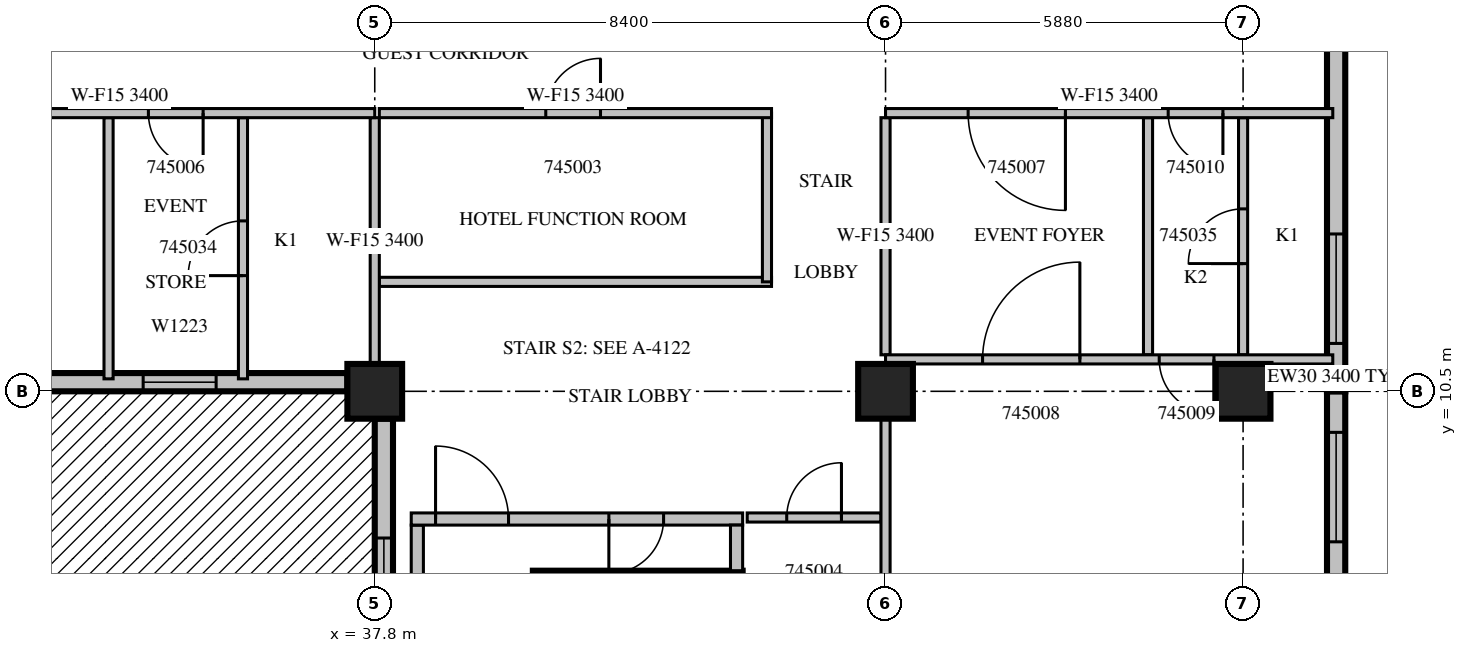
"""IFC4 building model, lengths in metres.
Left out: names, types, materials, properties, quantities, classifications, styles, units other than length and angle.
Written with IfcOpenShell. Run it as: python <this file> out.ifc"""

import sys

from ifc_helpers import new_model, si_unit, direction, frame, frame_2d, origin, origin_2d, place, context, subcontext, project, spatial, rectangle, extrude, source, transform, mapped, element, fill, save


model = new_model("IFC4")
c1 = context("Model", 3, precision=1e-05, world=origin(), true_north=direction((0.0, 1.0)))
c2 = subcontext(c1, "Body", "Model", "MODEL_VIEW")
j1 = project(units=[si_unit("LENGTHUNIT", "METRE"), si_unit("PLANEANGLEUNIT", "RADIAN")], contexts=[c1])
p1 = place(None, origin())
s1 = spatial("IfcSite", under=j1, at=p1, CompositionType="ELEMENT")
p2 = place(p1, origin())
s2 = spatial("IfcBuilding", under=s1, at=p2, CompositionType="ELEMENT")
p3 = place(p2, frame((0.0, 0.0, 204.4)))
s3 = spatial("IfcBuildingStorey", under=s2, at=p3, CompositionType="ELEMENT", Elevation=204.4)
m1 = source(origin(), c2, "Body", "SweptSolid", [
    extrude(rectangle(XDim=0.9, YDim=0.9, at=origin_2d()), origin(), (0.0, 0.0, 1.0), 3.8),
])
for number, where, z_axis, x_axis in (
    (1, (37.8, 10.5, 0.0), (0.0, 0.0, 1.0), (1.0, 0.0, 0.0)),
    (2, (46.2, 10.5, 0.0), (0.0, 0.0, 1.0), (1.0, 0.0, 0.0)),
    (3, (52.08, 10.5, 0.0), (0.0, 0.0, 1.0), (1.0, 0.0, 0.0)),
):
    element("IfcColumn", number, at=place(p3, frame(where, z_axis=z_axis, x_axis=x_axis)), inside=s3, PredefinedType="COLUMN", context=c2, shape_type="MappedRepresentation", body=[
        mapped(m1, transform((0.0, 0.0, 0.0), scale=1.0)),
    ])
m2 = source(origin(), c2, "Body", "SweptSolid", [
    extrude(rectangle(XDim=7.5, YDim=0.3, at=frame_2d((3.75, 0.0))), origin(), (0.0, 0.0, 1.0), 3.4),
])
p4 = place(p3, frame((29.85, 10.65, 0.0), z_axis=(0.0, 0.0, 1.0), x_axis=(1.0, 0.0, 0.0)))
e4 = element("IfcWall", 4, at=p4, inside=s3, PredefinedType="STANDARD", context=c2, shape_type="MappedRepresentation", body=[
    mapped(m2, transform((0.0, 0.0, 0.0), scale=1.0)),
])
m3 = source(origin(), c2, "Body", "SweptSolid", [
    extrude(rectangle(XDim=1.8, YDim=2.4, at=frame_2d((0.9, 1.2))), frame((0.0, 0.16, 0.0), z_axis=(0.0, -1.0, 0.0), x_axis=(1.0, 0.0, 0.0)), (0.0, 0.0, 1.0), 0.32),
])
p5 = place(p4, frame((0.75, 0.0, 0.0)))
e5 = element("IfcOpeningElement", 5, at=p5, cuts=e4, PredefinedType="OPENING", context=c2, shape_type="MappedRepresentation", body=[
    mapped(m3, transform((0.0, 0.0, 0.0), scale=1.0)),
])
m4 = source(origin(), c2, "Body", "SweptSolid", [
    extrude(rectangle(XDim=1.2, YDim=2.3, at=frame_2d((0.6, 1.15))), frame((0.0, 0.16, 0.0), z_axis=(0.0, -1.0, 0.0), x_axis=(1.0, 0.0, 0.0)), (0.0, 0.0, 1.0), 0.32),
])
p6 = place(p4, frame((4.141, 0.0, 0.6)))
e6 = element("IfcOpeningElement", 6, at=p6, cuts=e4, PredefinedType="OPENING", context=c2, shape_type="MappedRepresentation", body=[
    mapped(m4, transform((0.0, 0.0, 0.0), scale=1.0)),
])
m5 = source(origin(), c2, "Body", "SweptSolid", [
    extrude(rectangle(XDim=9.15, YDim=0.3, at=frame_2d((4.575, 0.0))), origin(), (0.0, 0.0, 1.0), 3.4),
])
p7 = place(p3, frame((37.95, 10.05, 0.0), z_axis=(0.0, 0.0, 1.0), x_axis=(0.0, -1.0, 0.0)))
e7 = element("IfcWall", 7, at=p7, inside=s3, PredefinedType="STANDARD", context=c2, shape_type="MappedRepresentation", body=[
    mapped(m5, transform((0.0, 0.0, 0.0), scale=1.0)),
])
m6 = source(origin(), c2, "Body", "SweptSolid", [
    extrude(rectangle(XDim=1.8, YDim=2.3, at=frame_2d((0.9, 1.15))), frame((0.0, 0.16, 0.0), z_axis=(0.0, -1.0, 0.0), x_axis=(1.0, 0.0, 0.0)), (0.0, 0.0, 1.0), 0.32),
])
p8 = place(p7, frame((1.962, 0.0, 0.6)))
e8 = element("IfcOpeningElement", 8, at=p8, cuts=e7, PredefinedType="OPENING", context=c2, shape_type="MappedRepresentation", body=[
    mapped(m6, transform((0.0, 0.0, 0.0), scale=1.0)),
])
m7 = source(origin(), c2, "Body", "SweptSolid", [
    extrude(rectangle(XDim=3.0, YDim=2.3, at=frame_2d((1.5, 1.15))), frame((0.0, 0.16, 0.0), z_axis=(0.0, -1.0, 0.0), x_axis=(1.0, 0.0, 0.0)), (0.0, 0.0, 1.0), 0.32),
])
p9 = place(p7, frame((5.925, 0.0, 0.6)))
e9 = element("IfcOpeningElement", 9, at=p9, cuts=e7, PredefinedType="OPENING", context=c2, shape_type="MappedRepresentation", body=[
    mapped(m7, transform((0.0, 0.0, 0.0), scale=1.0)),
])
m8 = source(origin(), c2, "Body", "SweptSolid", [
    extrude(rectangle(XDim=6.3, YDim=0.3, at=frame_2d((3.15, 0.0))), origin(), (0.0, 0.0, 1.0), 3.4),
])
p10 = place(p3, frame((53.61, 4.2, 0.0), z_axis=(0.0, 0.0, 1.0), x_axis=(0.0, 1.0, 0.0)))
e10 = element("IfcWall", 10, at=p10, inside=s3, PredefinedType="STANDARD", context=c2, shape_type="MappedRepresentation", body=[
    mapped(m8, transform((0.0, 0.0, 0.0), scale=1.0)),
])
p11 = place(p10, frame((0.675, 0.0, 0.0)))
e11 = element("IfcOpeningElement", 11, at=p11, cuts=e10, PredefinedType="OPENING", context=c2, shape_type="MappedRepresentation", body=[
    mapped(m3, transform((0.0, 0.0, 0.0), scale=1.0)),
])
p12 = place(p10, frame((3.825, 0.0, 0.0)))
e12 = element("IfcOpeningElement", 12, at=p12, cuts=e10, PredefinedType="OPENING", context=c2, shape_type="MappedRepresentation", body=[
    mapped(m3, transform((0.0, 0.0, 0.0), scale=1.0)),
])
m9 = source(origin(), c2, "Body", "SweptSolid", [
    extrude(rectangle(XDim=6.75, YDim=0.3, at=frame_2d((3.375, 0.0))), origin(), (0.0, 0.0, 1.0), 3.4),
])
p13 = place(p3, frame((53.61, 10.5, 0.0), z_axis=(0.0, 0.0, 1.0), x_axis=(0.0, 1.0, 0.0)))
e13 = element("IfcWall", 13, at=p13, inside=s3, PredefinedType="STANDARD", context=c2, shape_type="MappedRepresentation", body=[
    mapped(m9, transform((0.0, 0.0, 0.0), scale=1.0)),
])
p14 = place(p13, frame((0.787, 0.0, 0.0)))
e14 = element("IfcOpeningElement", 14, at=p14, cuts=e13, PredefinedType="OPENING", context=c2, shape_type="MappedRepresentation", body=[
    mapped(m3, transform((0.0, 0.0, 0.0), scale=1.0)),
])
m10 = source(origin(), c2, "Body", "SweptSolid", [
    extrude(rectangle(XDim=3.45, YDim=0.25, at=frame_2d((1.725, 0.0))), origin(), (0.0, 0.0, 1.0), 3.4),
])
p15 = place(p3, frame((40.4, 7.425, 0.0), z_axis=(0.0, 0.0, 1.0), x_axis=(1.0, 0.0, 0.0)))
e15 = element("IfcWall", 15, at=p15, inside=s3, PredefinedType="SOLIDWALL", context=c2, shape_type="MappedRepresentation", body=[
    mapped(m10, transform((0.0, 0.0, 0.0), scale=1.0)),
])
m11 = source(origin(), c2, "Body", "SweptSolid", [
    extrude(rectangle(XDim=8.0, YDim=0.2, at=frame_2d((4.0, 0.0))), origin(), (0.0, 0.0, 1.0), 3.4),
])
p16 = place(p3, frame((38.5, 0.3, 0.0), z_axis=(0.0, 0.0, 1.0), x_axis=(0.0, 1.0, 0.0)))
e16 = element("IfcWall", 16, at=p16, inside=s3, PredefinedType="PARTITIONING", context=c2, shape_type="MappedRepresentation", body=[
    mapped(m11, transform((0.0, 0.0, 0.0), scale=1.0)),
])
m12 = source(origin(), c2, "Body", "SweptSolid", [
    extrude(rectangle(XDim=5.45, YDim=0.2, at=frame_2d((2.725, 0.0))), origin(), (0.0, 0.0, 1.0), 3.4),
])
p17 = place(p3, frame((38.4, 8.4, 0.0), z_axis=(0.0, 0.0, 1.0), x_axis=(1.0, 0.0, 0.0)))
e17 = element("IfcWall", 17, at=p17, inside=s3, PredefinedType="PARTITIONING", context=c2, shape_type="MappedRepresentation", body=[
    mapped(m12, transform((0.0, 0.0, 0.0), scale=1.0)),
])
m13 = source(origin(), c2, "Body", "SweptSolid", [
    extrude(rectangle(XDim=1.2, YDim=2.1, at=frame_2d((0.6, 1.05))), frame((0.0, 0.11, 0.0), z_axis=(0.0, -1.0, 0.0), x_axis=(1.0, 0.0, 0.0)), (0.0, 0.0, 1.0), 0.22),
])
p18 = place(p17, frame((0.4, 0.0, 0.0)))
e18 = element("IfcOpeningElement", 18, at=p18, cuts=e17, PredefinedType="OPENING", context=c2, shape_type="MappedRepresentation", body=[
    mapped(m13, transform((0.0, 0.0, 0.0), scale=1.0)),
])
m14 = source(origin(), c2, "Body", "SweptSolid", [
    extrude(rectangle(XDim=0.9, YDim=2.1, at=frame_2d((0.45, 1.05))), frame((0.0, 0.11, 0.0), z_axis=(0.0, -1.0, 0.0), x_axis=(1.0, 0.0, 0.0)), (0.0, 0.0, 1.0), 0.22),
])
p19 = place(p17, frame((3.25, 0.0, 0.0)))
e19 = element("IfcOpeningElement", 19, at=p19, cuts=e17, PredefinedType="OPENING", context=c2, shape_type="MappedRepresentation", body=[
    mapped(m14, transform((0.0, 0.0, 0.0), scale=1.0)),
])
m15 = source(origin(), c2, "Body", "SweptSolid", [
    extrude(rectangle(XDim=0.75, YDim=0.2, at=frame_2d((0.375, 0.0))), origin(), (0.0, 0.0, 1.0), 3.4),
])
p20 = place(p3, frame((43.75, 7.55, 0.0), z_axis=(0.0, 0.0, 1.0), x_axis=(0.0, 1.0, 0.0)))
e20 = element("IfcWall", 20, at=p20, inside=s3, PredefinedType="PARTITIONING", context=c2, shape_type="MappedRepresentation", body=[
    mapped(m15, transform((0.0, 0.0, 0.0), scale=1.0)),
])
m16 = source(origin(), c2, "Body", "SweptSolid", [
    extrude(rectangle(XDim=6.45, YDim=0.15, at=frame_2d((3.225, 0.0))), origin(), (0.0, 0.0, 1.0), 3.4),
])
p21 = place(p3, frame((37.875, 12.3, 0.0), z_axis=(0.0, 0.0, 1.0), x_axis=(1.0, 0.0, 0.0)))
e21 = element("IfcWall", 21, at=p21, inside=s3, PredefinedType="PARTITIONING", context=c2, shape_type="MappedRepresentation", body=[
    mapped(m16, transform((0.0, 0.0, 0.0), scale=1.0)),
])
m17 = source(origin(), c2, "Body", "SweptSolid", [
    extrude(rectangle(XDim=2.775, YDim=0.15, at=frame_2d((1.387, 0.0))), origin(), (0.0, 0.0, 1.0), 3.4),
])
p22 = place(p3, frame((44.25, 12.3, 0.0), z_axis=(0.0, 0.0, 1.0), x_axis=(0.0, 1.0, 0.0)))
e22 = element("IfcWall", 22, at=p22, inside=s3, PredefinedType="PARTITIONING", context=c2, shape_type="MappedRepresentation", body=[
    mapped(m17, transform((0.0, 0.0, 0.0), scale=1.0)),
])
p23 = place(p3, frame((44.325, 15.075, 0.0), z_axis=(0.0, 0.0, 1.0), x_axis=(-1.0, 0.0, 0.0)))
e23 = element("IfcWall", 23, at=p23, inside=s3, PredefinedType="PARTITIONING", context=c2, shape_type="MappedRepresentation", body=[
    mapped(m16, transform((0.0, 0.0, 0.0), scale=1.0)),
])
m18 = source(origin(), c2, "Body", "SweptSolid", [
    extrude(rectangle(XDim=0.9, YDim=2.1, at=frame_2d((0.45, 1.05))), frame((0.0, 0.085, 0.0), z_axis=(0.0, -1.0, 0.0), x_axis=(1.0, 0.0, 0.0)), (0.0, 0.0, 1.0), 0.17),
])
p24 = place(p23, frame((2.812, 0.0, 0.0)))
e24 = element("IfcOpeningElement", 24, at=p24, cuts=e23, PredefinedType="OPENING", context=c2, shape_type="MappedRepresentation", body=[
    mapped(m18, transform((0.0, 0.0, 0.0), scale=1.0)),
])
m19 = source(origin(), c2, "Body", "SweptSolid", [
    extrude(rectangle(XDim=2.2, YDim=0.15, at=frame_2d((1.1, 0.0))), origin(), (0.0, 0.0, 1.0), 3.4),
])
p25 = place(p3, frame((46.125, 8.425, 0.0), z_axis=(0.0, 0.0, 1.0), x_axis=(-1.0, 0.0, 0.0)))
e25 = element("IfcWall", 25, at=p25, inside=s3, PredefinedType="PARTITIONING", context=c2, shape_type="MappedRepresentation", body=[
    mapped(m19, transform((0.0, 0.0, 0.0), scale=1.0)),
])
p26 = place(p25, frame((0.65, 0.0, 0.0)))
e26 = element("IfcOpeningElement", 26, at=p26, cuts=e25, PredefinedType="OPENING", context=c2, shape_type="MappedRepresentation", body=[
    mapped(m18, transform((0.0, 0.0, 0.0), scale=1.0)),
])
m20 = source(origin(), c2, "Body", "SweptSolid", [
    extrude(rectangle(XDim=4.295, YDim=0.15, at=frame_2d((2.147, 0.0))), origin(), (0.0, 0.0, 1.0), 3.4),
])
p27 = place(p3, frame((33.422, 10.705, 0.0), z_axis=(0.0, 0.0, 1.0), x_axis=(0.0, 1.0, 0.0)))
e27 = element("IfcWall", 27, at=p27, inside=s3, PredefinedType="PARTITIONING", context=c2, shape_type="MappedRepresentation", body=[
    mapped(m20, transform((0.0, 0.0, 0.0), scale=1.0)),
])
p28 = place(p3, frame((35.633, 10.705, 0.0), z_axis=(0.0, 0.0, 1.0), x_axis=(0.0, 1.0, 0.0)))
e28 = element("IfcWall", 28, at=p28, inside=s3, PredefinedType="PARTITIONING", context=c2, shape_type="MappedRepresentation", body=[
    mapped(m20, transform((0.0, 0.0, 0.0), scale=1.0)),
])
p29 = place(p28, frame((1.698, 0.0, 0.0)))
e29 = element("IfcOpeningElement", 29, at=p29, cuts=e28, PredefinedType="OPENING", context=c2, shape_type="MappedRepresentation", body=[
    mapped(m18, transform((0.0, 0.0, 0.0), scale=1.0)),
])
m21 = source(origin(), c2, "Body", "SweptSolid", [
    extrude(rectangle(XDim=4.051, YDim=0.15, at=frame_2d((2.026, 0.0))), origin(), (0.0, 0.0, 1.0), 3.4),
])
p30 = place(p3, frame((37.8, 10.949, 0.0), z_axis=(0.0, 0.0, 1.0), x_axis=(0.0, 1.0, 0.0)))
e30 = element("IfcWall", 30, at=p30, inside=s3, PredefinedType="PARTITIONING", context=c2, shape_type="MappedRepresentation", body=[
    mapped(m21, transform((0.0, 0.0, 0.0), scale=1.0)),
])
m22 = source(origin(), c2, "Body", "SweptSolid", [
    extrude(rectangle(XDim=3.9, YDim=0.15, at=frame_2d((1.95, 0.0))), origin(), (0.0, 0.0, 1.0), 3.4),
])
p31 = place(p3, frame((50.517, 11.1, 0.0), z_axis=(0.0, 0.0, 1.0), x_axis=(0.0, 1.0, 0.0)))
e31 = element("IfcWall", 31, at=p31, inside=s3, PredefinedType="PARTITIONING", context=c2, shape_type="MappedRepresentation", body=[
    mapped(m22, transform((0.0, 0.0, 0.0), scale=1.0)),
])
p32 = place(p3, frame((52.08, 11.1, 0.0), z_axis=(0.0, 0.0, 1.0), x_axis=(0.0, 1.0, 0.0)))
e32 = element("IfcWall", 32, at=p32, inside=s3, PredefinedType="PARTITIONING", context=c2, shape_type="MappedRepresentation", body=[
    mapped(m22, transform((0.0, 0.0, 0.0), scale=1.0)),
])
p33 = place(p32, frame((1.5, 0.0, 0.0)))
e33 = element("IfcOpeningElement", 33, at=p33, cuts=e32, PredefinedType="OPENING", context=c2, shape_type="MappedRepresentation", body=[
    mapped(m18, transform((0.0, 0.0, 0.0), scale=1.0)),
])
m23 = source(origin(), c2, "Body", "SweptSolid", [
    extrude(rectangle(XDim=9.152, YDim=0.15, at=frame_2d((4.576, 0.0))), origin(), (0.0, 0.0, 1.0), 3.4),
])
p34 = place(p3, frame((46.2, 0.899, 0.0), z_axis=(0.0, 0.0, 1.0), x_axis=(0.0, 1.0, 0.0)))
e34 = element("IfcWall", 34, at=p34, inside=s3, PredefinedType="PARTITIONING", context=c2, shape_type="MappedRepresentation", body=[
    mapped(m23, transform((0.0, 0.0, 0.0), scale=1.0)),
])
p35 = place(p3, frame((46.2, 11.1, 0.0), z_axis=(0.0, 0.0, 1.0), x_axis=(0.0, 1.0, 0.0)))
e35 = element("IfcWall", 35, at=p35, inside=s3, PredefinedType="PARTITIONING", context=c2, shape_type="MappedRepresentation", body=[
    mapped(m22, transform((0.0, 0.0, 0.0), scale=1.0)),
])
p36 = place(p3, frame((53.555, 11.025, 0.0), z_axis=(0.0, 0.0, 1.0), x_axis=(-1.0, 0.0, 0.0)))
e36 = element("IfcWall", 36, at=p36, inside=s3, PredefinedType="PARTITIONING", context=c2, shape_type="SweptSolid", body=[
    extrude(rectangle(XDim=7.355, YDim=0.15, at=frame_2d((3.678, 0.0))), origin(), (0.0, 0.0, 1.0), 3.4),
])
m24 = source(origin(), c2, "Body", "SweptSolid", [
    extrude(rectangle(XDim=1.6, YDim=2.1, at=frame_2d((0.8, 1.05))), frame((0.0, 0.085, 0.0), z_axis=(0.0, -1.0, 0.0), x_axis=(1.0, 0.0, 0.0)), (0.0, 0.0, 1.0), 0.17),
])
p37 = place(p36, frame((4.159, 0.0, 0.0)))
e37 = element("IfcOpeningElement", 37, at=p37, cuts=e36, PredefinedType="OPENING", context=c2, shape_type="MappedRepresentation", body=[
    mapped(m24, transform((0.0, 0.0, 0.0), scale=1.0)),
])
p38 = place(p36, frame((1.954, 0.0, 0.0)))
e38 = element("IfcOpeningElement", 38, at=p38, cuts=e36, PredefinedType="OPENING", context=c2, shape_type="MappedRepresentation", body=[
    mapped(m18, transform((0.0, 0.0, 0.0), scale=1.0)),
])
m25 = source(origin(), c2, "Body", "SweptSolid", [
    extrude(rectangle(XDim=8.4, YDim=0.15, at=frame_2d((4.2, 0.0))), origin(), (0.0, 0.0, 1.0), 3.4),
])
p39 = place(p3, frame((37.8, 15.075, 0.0), z_axis=(0.0, 0.0, 1.0), x_axis=(-1.0, 0.0, 0.0)))
e39 = element("IfcWall", 39, at=p39, inside=s3, PredefinedType="PARTITIONING", context=c2, shape_type="MappedRepresentation", body=[
    mapped(m25, transform((0.0, 0.0, 0.0), scale=1.0)),
])
p40 = place(p39, frame((5.589, 0.0, 0.0)))
e40 = element("IfcOpeningElement", 40, at=p40, cuts=e39, PredefinedType="OPENING", context=c2, shape_type="MappedRepresentation", body=[
    mapped(m24, transform((0.0, 0.0, 0.0), scale=1.0)),
])
p41 = place(p39, frame((2.822, 0.0, 0.0)))
e41 = element("IfcOpeningElement", 41, at=p41, cuts=e39, PredefinedType="OPENING", context=c2, shape_type="MappedRepresentation", body=[
    mapped(m18, transform((0.0, 0.0, 0.0), scale=1.0)),
])
m26 = source(origin(), c2, "Body", "SweptSolid", [
    extrude(rectangle(XDim=7.355, YDim=0.15, at=frame_2d((3.678, 0.0))), origin(), (0.0, 0.0, 1.0), 3.4),
])
p42 = place(p3, frame((53.555, 15.075, 0.0), z_axis=(0.0, 0.0, 1.0), x_axis=(-1.0, 0.0, 0.0)))
e42 = element("IfcWall", 42, at=p42, inside=s3, PredefinedType="PARTITIONING", context=c2, shape_type="MappedRepresentation", body=[
    mapped(m26, transform((0.0, 0.0, 0.0), scale=1.0)),
])
p43 = place(p42, frame((4.397, 0.0, 0.0)))
e43 = element("IfcOpeningElement", 43, at=p43, cuts=e42, PredefinedType="OPENING", context=c2, shape_type="MappedRepresentation", body=[
    mapped(m24, transform((0.0, 0.0, 0.0), scale=1.0)),
])
p44 = place(p42, frame((1.807, 0.0, 0.0)))
e44 = element("IfcOpeningElement", 44, at=p44, cuts=e42, PredefinedType="OPENING", context=c2, shape_type="MappedRepresentation", body=[
    mapped(m18, transform((0.0, 0.0, 0.0), scale=1.0)),
])
m27 = source(origin(), c2, "Body", "SweptSolid", [
    extrude(rectangle(XDim=1.2, YDim=2.3, at=frame_2d((0.6, 1.15))), frame((0.0, 0.03, 0.0), z_axis=(0.0, -1.0, 0.0), x_axis=(1.0, 0.0, 0.0)), (0.0, 0.0, 1.0), 0.06),
])
p45 = place(p6, origin())
e45 = element("IfcWindow", 45, at=p45, inside=s3, PartitioningType="SINGLE_PANEL", PredefinedType="WINDOW", context=c2, shape_type="MappedRepresentation", body=[
    mapped(m27, transform((0.0, 0.0, 0.0), scale=1.0)),
])
fill(e6, e45)
m28 = source(origin(), c2, "Body", "SweptSolid", [
    extrude(rectangle(XDim=1.8, YDim=2.3, at=frame_2d((0.9, 1.15))), frame((0.0, 0.03, 0.0), z_axis=(0.0, -1.0, 0.0), x_axis=(1.0, 0.0, 0.0)), (0.0, 0.0, 1.0), 0.06),
])
p46 = place(p8, origin())
e46 = element("IfcWindow", 46, at=p46, inside=s3, PartitioningType="SINGLE_PANEL", PredefinedType="WINDOW", context=c2, shape_type="MappedRepresentation", body=[
    mapped(m28, transform((0.0, 0.0, 0.0), scale=1.0)),
])
fill(e8, e46)
m29 = source(origin(), c2, "Body", "SweptSolid", [
    extrude(rectangle(XDim=1.8, YDim=2.4, at=frame_2d((0.9, 1.2))), frame((0.0, 0.025, 0.0), z_axis=(0.0, -1.0, 0.0), x_axis=(1.0, 0.0, 0.0)), (0.0, 0.0, 1.0), 0.05),
])
p47 = place(p12, origin())
e47 = element("IfcDoor", 47, at=p47, inside=s3, OperationType="SLIDING_TO_LEFT", PredefinedType="DOOR", context=c2, shape_type="MappedRepresentation", body=[
    mapped(m29, transform((0.0, 0.0, 0.0), scale=1.0)),
])
fill(e12, e47)
p48 = place(p14, origin())
e48 = element("IfcDoor", 48, at=p48, inside=s3, OperationType="SLIDING_TO_LEFT", PredefinedType="DOOR", context=c2, shape_type="MappedRepresentation", body=[
    mapped(m29, transform((0.0, 0.0, 0.0), scale=1.0)),
])
fill(e14, e48)
m30 = source(origin(), c2, "Body", "SweptSolid", [
    extrude(rectangle(XDim=1.2, YDim=2.1, at=frame_2d((0.6, 1.05))), frame((0.0, 0.025, 0.0), z_axis=(0.0, -1.0, 0.0), x_axis=(1.0, 0.0, 0.0)), (0.0, 0.0, 1.0), 0.05),
])
p49 = place(p18, origin())
e49 = element("IfcDoor", 49, at=p49, inside=s3, OperationType="SINGLE_SWING_LEFT", PredefinedType="DOOR", context=c2, shape_type="MappedRepresentation", body=[
    mapped(m30, transform((0.0, 0.0, 0.0), scale=1.0)),
])
fill(e18, e49)
m31 = source(origin(), c2, "Body", "SweptSolid", [
    extrude(rectangle(XDim=0.9, YDim=2.1, at=frame_2d((0.45, 1.05))), frame((0.0, 0.025, 0.0), z_axis=(0.0, -1.0, 0.0), x_axis=(1.0, 0.0, 0.0)), (0.0, 0.0, 1.0), 0.05),
])
p50 = place(p19, origin())
e50 = element("IfcDoor", 50, at=p50, inside=s3, OperationType="SINGLE_SWING_RIGHT", PredefinedType="DOOR", context=c2, shape_type="MappedRepresentation", body=[
    mapped(m31, transform((0.0, 0.0, 0.0), scale=1.0)),
])
fill(e19, e50)
p51 = place(p24, origin())
e51 = element("IfcDoor", 51, at=p51, inside=s3, OperationType="SINGLE_SWING_RIGHT", PredefinedType="DOOR", context=c2, shape_type="MappedRepresentation", body=[
    mapped(m31, transform((0.0, 0.0, 0.0), scale=1.0)),
])
fill(e24, e51)
p52 = place(p26, origin())
e52 = element("IfcDoor", 52, at=p52, inside=s3, OperationType="SINGLE_SWING_RIGHT", PredefinedType="DOOR", context=c2, shape_type="MappedRepresentation", body=[
    mapped(m31, transform((0.0, 0.0, 0.0), scale=1.0)),
])
fill(e26, e52)
p53 = place(p41, origin())
e53 = element("IfcDoor", 53, at=p53, inside=s3, OperationType="SINGLE_SWING_LEFT", PredefinedType="DOOR", context=c2, shape_type="MappedRepresentation", body=[
    mapped(m31, transform((0.0, 0.0, 0.0), scale=1.0)),
])
fill(e41, e53)
m32 = source(origin(), c2, "Body", "SweptSolid", [
    extrude(rectangle(XDim=1.6, YDim=2.1, at=frame_2d((0.8, 1.05))), frame((0.0, 0.025, 0.0), z_axis=(0.0, -1.0, 0.0), x_axis=(1.0, 0.0, 0.0)), (0.0, 0.0, 1.0), 0.05),
])
p54 = place(p43, origin())
e54 = element("IfcDoor", 54, at=p54, inside=s3, OperationType="SINGLE_SWING_LEFT", PredefinedType="DOOR", context=c2, shape_type="MappedRepresentation", body=[
    mapped(m32, transform((0.0, 0.0, 0.0), scale=1.0)),
])
fill(e43, e54)
p55 = place(p37, origin())
e55 = element("IfcDoor", 55, at=p55, inside=s3, OperationType="SINGLE_SWING_RIGHT", PredefinedType="DOOR", context=c2, shape_type="MappedRepresentation", body=[
    mapped(m32, transform((0.0, 0.0, 0.0), scale=1.0)),
])
fill(e37, e55)
p56 = place(p38, origin())
e56 = element("IfcDoor", 56, at=p56, inside=s3, OperationType="SINGLE_SWING_LEFT", PredefinedType="DOOR", context=c2, shape_type="MappedRepresentation", body=[
    mapped(m31, transform((0.0, 0.0, 0.0), scale=1.0)),
])
fill(e38, e56)
p57 = place(p44, origin())
e57 = element("IfcDoor", 57, at=p57, inside=s3, OperationType="SINGLE_SWING_LEFT", PredefinedType="DOOR", context=c2, shape_type="MappedRepresentation", body=[
    mapped(m31, transform((0.0, 0.0, 0.0), scale=1.0)),
])
fill(e44, e57)
p58 = place(p29, origin())
e58 = element("IfcDoor", 58, at=p58, inside=s3, OperationType="SINGLE_SWING_LEFT", PredefinedType="DOOR", context=c2, shape_type="MappedRepresentation", body=[
    mapped(m31, transform((0.0, 0.0, 0.0), scale=1.0)),
])
fill(e29, e58)
p59 = place(p33, origin())
e59 = element("IfcDoor", 59, at=p59, inside=s3, OperationType="SINGLE_SWING_LEFT", PredefinedType="DOOR", context=c2, shape_type="MappedRepresentation", body=[
    mapped(m31, transform((0.0, 0.0, 0.0), scale=1.0)),
])
fill(e33, e59)
save(model, sys.argv[1])
